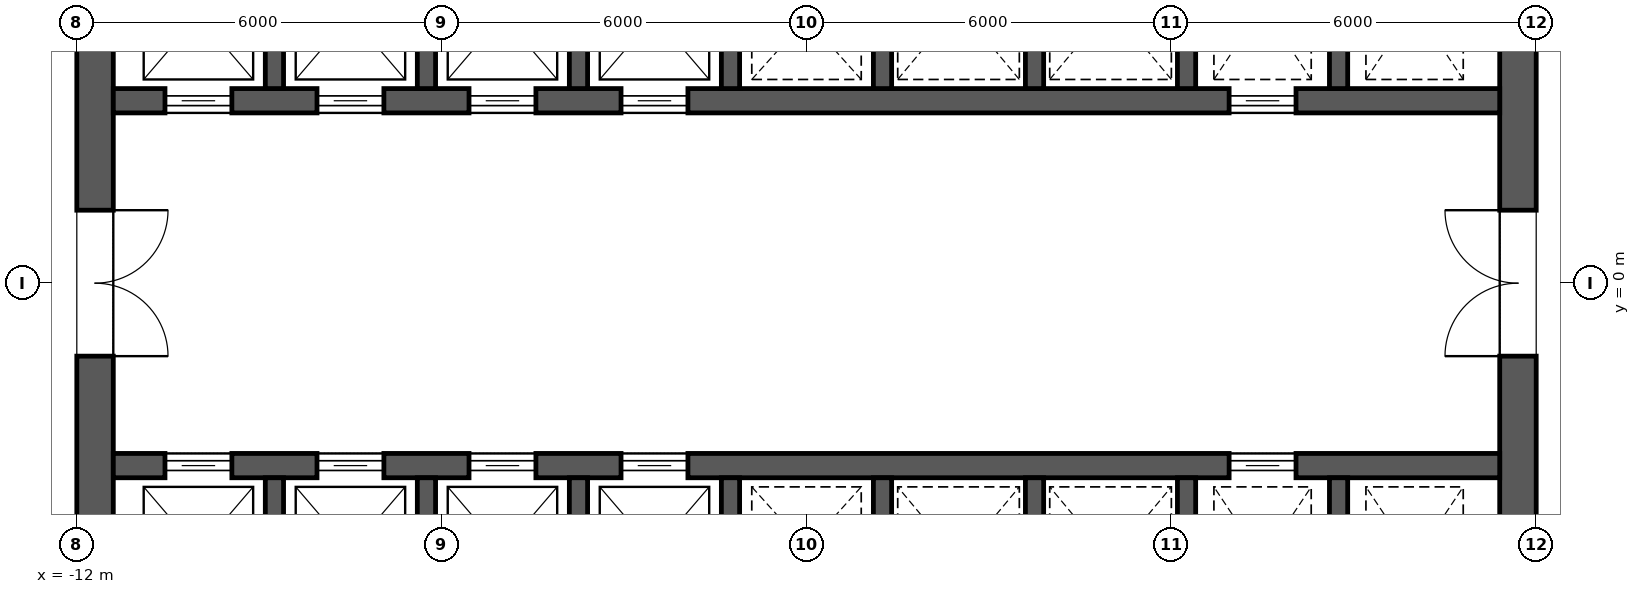
"""IFC4 building model, lengths in metres.
Left out: names, types, materials, properties, quantities, classifications, styles, units other than length and angle.
Written with IfcOpenShell. Run it as: python <this file> out.ifc"""

import sys

from ifc_helpers import new_model, si_unit, direction, frame, frame_2d, origin, place, context, subcontext, project, spatial, rectangle, extrude, element, fill, save


model = new_model("IFC4")
c1 = context("Model", 3, precision=1e-05, world=origin(), true_north=direction((0.0, 1.0)))
c2 = subcontext(c1, "Body", "Model", "MODEL_VIEW")
j1 = project(units=[si_unit("LENGTHUNIT", "METRE"), si_unit("PLANEANGLEUNIT", "RADIAN")], contexts=[c1])
p1 = place(None, origin())
s1 = spatial("IfcSite", under=j1, at=p1, CompositionType="ELEMENT")
p2 = place(p1, origin())
s2 = spatial("IfcBuilding", under=s1, at=p2, CompositionType="ELEMENT")
p3 = place(p2, frame((0.0, 0.0, 150.7)))
s3 = spatial("IfcBuildingStorey", under=s2, at=p3, CompositionType="ELEMENT", Elevation=150.7)
p4 = place(p3, frame((11.7, -11.4, 0.0), z_axis=(0.0, 0.0, 1.0), x_axis=(0.0, 1.0, 0.0)))
e1 = element("IfcWall", 1, at=p4, inside=s3, PredefinedType="SHEAR", context=c2, shape_type="SweptSolid", body=[
    extrude(rectangle(XDim=22.8, YDim=0.6, at=frame_2d((11.4, 0.0))), origin(), (0.0, 0.0, 1.0), 4.2),
])
p5 = place(p4, frame((10.2, 0.0, 0.0)))
e2 = element("IfcOpeningElement", 2, at=p5, cuts=e1, PredefinedType="OPENING", context=c2, shape_type="SweptSolid", body=[
    extrude(rectangle(XDim=2.4, YDim=2.1, at=frame_2d((1.2, 1.05))), frame((0.0, 0.312, 0.0), z_axis=(0.0, -1.0, 0.0), x_axis=(1.0, 0.0, 0.0)), (0.0, 0.0, 1.0), 0.624),
])
p6 = place(p4, frame((19.5, 0.0, 0.0)))
e3 = element("IfcOpeningElement", 3, at=p6, cuts=e1, PredefinedType="OPENING", context=c2, shape_type="SweptSolid", body=[
    extrude(rectangle(XDim=1.2, YDim=2.1, at=frame_2d((0.6, 1.05))), frame((0.0, 0.312, 0.0), z_axis=(0.0, -1.0, 0.0), x_axis=(1.0, 0.0, 0.0)), (0.0, 0.0, 1.0), 0.624),
])
p7 = place(p4, frame((2.1, 0.0, 0.0)))
e4 = element("IfcOpeningElement", 4, at=p7, cuts=e1, PredefinedType="OPENING", context=c2, shape_type="SweptSolid", body=[
    extrude(rectangle(XDim=1.2, YDim=2.1, at=frame_2d((0.6, 1.05))), frame((0.0, 0.312, 0.0), z_axis=(0.0, -1.0, 0.0), x_axis=(1.0, 0.0, 0.0)), (0.0, 0.0, 1.0), 0.624),
])
p8 = place(p3, frame((-11.7, -11.4, 0.0), z_axis=(0.0, 0.0, 1.0), x_axis=(0.0, 1.0, 0.0)))
e5 = element("IfcWall", 5, at=p8, inside=s3, PredefinedType="SHEAR", context=c2, shape_type="SweptSolid", body=[
    extrude(rectangle(XDim=22.8, YDim=0.6, at=frame_2d((11.4, 0.0))), origin(), (0.0, 0.0, 1.0), 4.2),
])
p9 = place(p8, frame((10.2, 0.0, 0.0)))
e6 = element("IfcOpeningElement", 6, at=p9, cuts=e5, PredefinedType="OPENING", context=c2, shape_type="SweptSolid", body=[
    extrude(rectangle(XDim=2.4, YDim=2.1, at=frame_2d((1.2, 1.05))), frame((0.0, 0.312, 0.0), z_axis=(0.0, -1.0, 0.0), x_axis=(1.0, 0.0, 0.0)), (0.0, 0.0, 1.0), 0.624),
])
p10 = place(p8, frame((18.925, 0.0, 0.0)))
e7 = element("IfcOpeningElement", 7, at=p10, cuts=e5, PredefinedType="OPENING", context=c2, shape_type="SweptSolid", body=[
    extrude(rectangle(XDim=1.2, YDim=2.1, at=frame_2d((0.6, 1.05))), frame((0.0, 0.312, 0.0), z_axis=(0.0, -1.0, 0.0), x_axis=(1.0, 0.0, 0.0)), (0.0, 0.0, 1.0), 0.624),
])
p11 = place(p8, frame((2.675, 0.0, 0.0)))
e8 = element("IfcOpeningElement", 8, at=p11, cuts=e5, PredefinedType="OPENING", context=c2, shape_type="SweptSolid", body=[
    extrude(rectangle(XDim=1.2, YDim=2.1, at=frame_2d((0.6, 1.05))), frame((0.0, 0.312, 0.0), z_axis=(0.0, -1.0, 0.0), x_axis=(1.0, 0.0, 0.0)), (0.0, 0.0, 1.0), 0.624),
])
p12 = place(p3, frame((-11.4, 3.0, 0.0), z_axis=(0.0, 0.0, 1.0), x_axis=(1.0, 0.0, 0.0)))
e9 = element("IfcWall", 9, at=p12, inside=s3, PredefinedType="SHEAR", context=c2, shape_type="SweptSolid", body=[
    extrude(rectangle(XDim=22.8, YDim=0.4, at=frame_2d((11.4, 0.0))), origin(), (0.0, 0.0, 1.0), 4.2),
])
p13 = place(p12, frame((0.85, 0.0, 0.0)))
e10 = element("IfcOpeningElement", 10, at=p13, cuts=e9, PredefinedType="OPENING", context=c2, shape_type="SweptSolid", body=[
    extrude(rectangle(XDim=1.1, YDim=2.1, at=frame_2d((0.55, 1.05))), frame((0.0, 0.212, 0.0), z_axis=(0.0, -1.0, 0.0), x_axis=(1.0, 0.0, 0.0)), (0.0, 0.0, 1.0), 0.424),
])
p14 = place(p12, frame((3.35, 0.0, 0.0)))
e11 = element("IfcOpeningElement", 11, at=p14, cuts=e9, PredefinedType="OPENING", context=c2, shape_type="SweptSolid", body=[
    extrude(rectangle(XDim=1.1, YDim=2.1, at=frame_2d((0.55, 1.05))), frame((0.0, 0.212, 0.0), z_axis=(0.0, -1.0, 0.0), x_axis=(1.0, 0.0, 0.0)), (0.0, 0.0, 1.0), 0.424),
])
p15 = place(p12, frame((5.85, 0.0, 0.0)))
e12 = element("IfcOpeningElement", 12, at=p15, cuts=e9, PredefinedType="OPENING", context=c2, shape_type="SweptSolid", body=[
    extrude(rectangle(XDim=1.1, YDim=2.1, at=frame_2d((0.55, 1.05))), frame((0.0, 0.212, 0.0), z_axis=(0.0, -1.0, 0.0), x_axis=(1.0, 0.0, 0.0)), (0.0, 0.0, 1.0), 0.424),
])
p16 = place(p12, frame((8.35, 0.0, 0.0)))
e13 = element("IfcOpeningElement", 13, at=p16, cuts=e9, PredefinedType="OPENING", context=c2, shape_type="SweptSolid", body=[
    extrude(rectangle(XDim=1.1, YDim=2.1, at=frame_2d((0.55, 1.05))), frame((0.0, 0.212, 0.0), z_axis=(0.0, -1.0, 0.0), x_axis=(1.0, 0.0, 0.0)), (0.0, 0.0, 1.0), 0.424),
])
p17 = place(p12, frame((18.35, 0.0, 0.0)))
e14 = element("IfcOpeningElement", 14, at=p17, cuts=e9, PredefinedType="OPENING", context=c2, shape_type="SweptSolid", body=[
    extrude(rectangle(XDim=1.1, YDim=2.1, at=frame_2d((0.55, 1.05))), frame((0.0, 0.212, 0.0), z_axis=(0.0, -1.0, 0.0), x_axis=(1.0, 0.0, 0.0)), (0.0, 0.0, 1.0), 0.424),
])
for number, where, z_axis, x_axis in (
    (15, (-8.75, 3.2, 0.0), (0.0, 0.0, 1.0), (0.0, 1.0, 0.0)),
    (16, (-6.25, 3.2, 0.0), (0.0, 0.0, 1.0), (0.0, 1.0, 0.0)),
    (17, (-3.75, 3.2, 0.0), (0.0, 0.0, 1.0), (0.0, 1.0, 0.0)),
    (18, (-1.25, 3.2, 0.0), (0.0, 0.0, 1.0), (0.0, 1.0, 0.0)),
    (19, (1.25, 3.2, 0.0), (0.0, 0.0, 1.0), (0.0, 1.0, 0.0)),
    (20, (3.75, 3.2, 0.0), (0.0, 0.0, 1.0), (0.0, 1.0, 0.0)),
    (21, (6.25, 3.2, 0.0), (0.0, 0.0, 1.0), (0.0, 1.0, 0.0)),
    (22, (8.75, 3.2, 0.0), (0.0, 0.0, 1.0), (0.0, 1.0, 0.0)),
):
    element("IfcWall", number, at=place(p3, frame(where, z_axis=z_axis, x_axis=x_axis)), inside=s3, PredefinedType="SHEAR", context=c2, shape_type="SweptSolid", body=[
        extrude(rectangle(XDim=2.9, YDim=0.3, at=frame_2d((1.45, 0.0))), origin(), (0.0, 0.0, 1.0), 4.2),
    ])
p18 = place(p3, frame((-11.4, -3.0, 0.0), z_axis=(0.0, 0.0, 1.0), x_axis=(1.0, 0.0, 0.0)))
e23 = element("IfcWall", 23, at=p18, inside=s3, PredefinedType="SHEAR", context=c2, shape_type="SweptSolid", body=[
    extrude(rectangle(XDim=22.8, YDim=0.4, at=frame_2d((11.4, 0.0))), origin(), (0.0, 0.0, 1.0), 4.2),
])
p19 = place(p18, frame((0.85, 0.0, 0.0)))
e24 = element("IfcOpeningElement", 24, at=p19, cuts=e23, PredefinedType="OPENING", context=c2, shape_type="SweptSolid", body=[
    extrude(rectangle(XDim=1.1, YDim=2.1, at=frame_2d((0.55, 1.05))), frame((0.0, 0.212, 0.0), z_axis=(0.0, -1.0, 0.0), x_axis=(1.0, 0.0, 0.0)), (0.0, 0.0, 1.0), 0.424),
])
p20 = place(p18, frame((3.35, 0.0, 0.0)))
e25 = element("IfcOpeningElement", 25, at=p20, cuts=e23, PredefinedType="OPENING", context=c2, shape_type="SweptSolid", body=[
    extrude(rectangle(XDim=1.1, YDim=2.1, at=frame_2d((0.55, 1.05))), frame((0.0, 0.212, 0.0), z_axis=(0.0, -1.0, 0.0), x_axis=(1.0, 0.0, 0.0)), (0.0, 0.0, 1.0), 0.424),
])
p21 = place(p18, frame((5.85, 0.0, 0.0)))
e26 = element("IfcOpeningElement", 26, at=p21, cuts=e23, PredefinedType="OPENING", context=c2, shape_type="SweptSolid", body=[
    extrude(rectangle(XDim=1.1, YDim=2.1, at=frame_2d((0.55, 1.05))), frame((0.0, 0.212, 0.0), z_axis=(0.0, -1.0, 0.0), x_axis=(1.0, 0.0, 0.0)), (0.0, 0.0, 1.0), 0.424),
])
p22 = place(p18, frame((8.35, 0.0, 0.0)))
e27 = element("IfcOpeningElement", 27, at=p22, cuts=e23, PredefinedType="OPENING", context=c2, shape_type="SweptSolid", body=[
    extrude(rectangle(XDim=1.1, YDim=2.1, at=frame_2d((0.55, 1.05))), frame((0.0, 0.212, 0.0), z_axis=(0.0, -1.0, 0.0), x_axis=(1.0, 0.0, 0.0)), (0.0, 0.0, 1.0), 0.424),
])
p23 = place(p18, frame((18.35, 0.0, 0.0)))
e28 = element("IfcOpeningElement", 28, at=p23, cuts=e23, PredefinedType="OPENING", context=c2, shape_type="SweptSolid", body=[
    extrude(rectangle(XDim=1.1, YDim=2.1, at=frame_2d((0.55, 1.05))), frame((0.0, 0.212, 0.0), z_axis=(0.0, -1.0, 0.0), x_axis=(1.0, 0.0, 0.0)), (0.0, 0.0, 1.0), 0.424),
])
for number, where, z_axis, x_axis in (
    (29, (-8.75, -6.1, 0.0), (0.0, 0.0, 1.0), (0.0, 1.0, 0.0)),
    (30, (-6.25, -6.1, 0.0), (0.0, 0.0, 1.0), (0.0, 1.0, 0.0)),
    (31, (-3.75, -6.1, 0.0), (0.0, 0.0, 1.0), (0.0, 1.0, 0.0)),
    (32, (-1.25, -6.1, 0.0), (0.0, 0.0, 1.0), (0.0, 1.0, 0.0)),
    (33, (1.25, -6.1, 0.0), (0.0, 0.0, 1.0), (0.0, 1.0, 0.0)),
    (34, (3.75, -6.1, 0.0), (0.0, 0.0, 1.0), (0.0, 1.0, 0.0)),
    (35, (6.25, -6.1, 0.0), (0.0, 0.0, 1.0), (0.0, 1.0, 0.0)),
    (36, (8.75, -6.1, 0.0), (0.0, 0.0, 1.0), (0.0, 1.0, 0.0)),
):
    element("IfcWall", number, at=place(p3, frame(where, z_axis=z_axis, x_axis=x_axis)), inside=s3, PredefinedType="SHEAR", context=c2, shape_type="SweptSolid", body=[
        extrude(rectangle(XDim=2.9, YDim=0.3, at=frame_2d((1.45, 0.0))), origin(), (0.0, 0.0, 1.0), 4.2),
    ])
p24 = place(p13, origin())
e37 = element("IfcDoor", 37, at=p24, inside=s3, OperationType="SLIDING_TO_LEFT", PredefinedType="DOOR", context=c2, shape_type="SweptSolid", body=[
    extrude(rectangle(XDim=1.1, YDim=2.1, at=frame_2d((0.55, 1.05))), frame((0.0, 0.025, 0.0), z_axis=(0.0, -1.0, 0.0), x_axis=(1.0, 0.0, 0.0)), (0.0, 0.0, 1.0), 0.05),
])
fill(e10, e37)
p25 = place(p14, origin())
e38 = element("IfcDoor", 38, at=p25, inside=s3, OperationType="SLIDING_TO_LEFT", PredefinedType="DOOR", context=c2, shape_type="SweptSolid", body=[
    extrude(rectangle(XDim=1.1, YDim=2.1, at=frame_2d((0.55, 1.05))), frame((0.0, 0.025, 0.0), z_axis=(0.0, -1.0, 0.0), x_axis=(1.0, 0.0, 0.0)), (0.0, 0.0, 1.0), 0.05),
])
fill(e11, e38)
p26 = place(p15, origin())
e39 = element("IfcDoor", 39, at=p26, inside=s3, OperationType="SLIDING_TO_LEFT", PredefinedType="DOOR", context=c2, shape_type="SweptSolid", body=[
    extrude(rectangle(XDim=1.1, YDim=2.1, at=frame_2d((0.55, 1.05))), frame((0.0, 0.025, 0.0), z_axis=(0.0, -1.0, 0.0), x_axis=(1.0, 0.0, 0.0)), (0.0, 0.0, 1.0), 0.05),
])
fill(e12, e39)
p27 = place(p16, origin())
e40 = element("IfcDoor", 40, at=p27, inside=s3, OperationType="SLIDING_TO_LEFT", PredefinedType="DOOR", context=c2, shape_type="SweptSolid", body=[
    extrude(rectangle(XDim=1.1, YDim=2.1, at=frame_2d((0.55, 1.05))), frame((0.0, 0.025, 0.0), z_axis=(0.0, -1.0, 0.0), x_axis=(1.0, 0.0, 0.0)), (0.0, 0.0, 1.0), 0.05),
])
fill(e13, e40)
p28 = place(p19, origin())
e41 = element("IfcDoor", 41, at=p28, inside=s3, OperationType="SLIDING_TO_LEFT", PredefinedType="DOOR", context=c2, shape_type="SweptSolid", body=[
    extrude(rectangle(XDim=1.1, YDim=2.1, at=frame_2d((0.55, 1.05))), frame((0.0, 0.025, 0.0), z_axis=(0.0, -1.0, 0.0), x_axis=(1.0, 0.0, 0.0)), (0.0, 0.0, 1.0), 0.05),
])
fill(e24, e41)
p29 = place(p20, origin())
e42 = element("IfcDoor", 42, at=p29, inside=s3, OperationType="SLIDING_TO_LEFT", PredefinedType="DOOR", context=c2, shape_type="SweptSolid", body=[
    extrude(rectangle(XDim=1.1, YDim=2.1, at=frame_2d((0.55, 1.05))), frame((0.0, 0.025, 0.0), z_axis=(0.0, -1.0, 0.0), x_axis=(1.0, 0.0, 0.0)), (0.0, 0.0, 1.0), 0.05),
])
fill(e25, e42)
p30 = place(p21, origin())
e43 = element("IfcDoor", 43, at=p30, inside=s3, OperationType="SLIDING_TO_LEFT", PredefinedType="DOOR", context=c2, shape_type="SweptSolid", body=[
    extrude(rectangle(XDim=1.1, YDim=2.1, at=frame_2d((0.55, 1.05))), frame((0.0, 0.025, 0.0), z_axis=(0.0, -1.0, 0.0), x_axis=(1.0, 0.0, 0.0)), (0.0, 0.0, 1.0), 0.05),
])
fill(e26, e43)
p31 = place(p22, origin())
e44 = element("IfcDoor", 44, at=p31, inside=s3, OperationType="SLIDING_TO_LEFT", PredefinedType="DOOR", context=c2, shape_type="SweptSolid", body=[
    extrude(rectangle(XDim=1.1, YDim=2.1, at=frame_2d((0.55, 1.05))), frame((0.0, 0.025, 0.0), z_axis=(0.0, -1.0, 0.0), x_axis=(1.0, 0.0, 0.0)), (0.0, 0.0, 1.0), 0.05),
])
fill(e27, e44)
p32 = place(p17, origin())
e45 = element("IfcDoor", 45, at=p32, inside=s3, OperationType="SLIDING_TO_LEFT", PredefinedType="DOOR", context=c2, shape_type="SweptSolid", body=[
    extrude(rectangle(XDim=1.1, YDim=2.1, at=frame_2d((0.55, 1.05))), frame((0.0, 0.025, 0.0), z_axis=(0.0, -1.0, 0.0), x_axis=(1.0, 0.0, 0.0)), (0.0, 0.0, 1.0), 0.05),
])
fill(e14, e45)
p33 = place(p23, origin())
e46 = element("IfcDoor", 46, at=p33, inside=s3, OperationType="SLIDING_TO_LEFT", PredefinedType="DOOR", context=c2, shape_type="SweptSolid", body=[
    extrude(rectangle(XDim=1.1, YDim=2.1, at=frame_2d((0.55, 1.05))), frame((0.0, 0.025, 0.0), z_axis=(0.0, -1.0, 0.0), x_axis=(1.0, 0.0, 0.0)), (0.0, 0.0, 1.0), 0.05),
])
fill(e28, e46)
p34 = place(p9, frame((2.4, 0.0, 0.0), z_axis=(0.0, 0.0, 1.0), x_axis=(-1.0, 0.0, 0.0)))
e47 = element("IfcDoor", 47, at=p34, inside=s3, OperationType="DOUBLE_DOOR_SINGLE_SWING", PredefinedType="DOOR", context=c2, shape_type="SweptSolid", body=[
    extrude(rectangle(XDim=2.4, YDim=2.1, at=frame_2d((1.2, 1.05))), frame((0.0, 0.025, 0.0), z_axis=(0.0, -1.0, 0.0), x_axis=(1.0, 0.0, 0.0)), (0.0, 0.0, 1.0), 0.05),
])
fill(e6, e47)
p35 = place(p5, origin())
e48 = element("IfcDoor", 48, at=p35, inside=s3, OperationType="DOUBLE_DOOR_SINGLE_SWING", PredefinedType="DOOR", context=c2, shape_type="SweptSolid", body=[
    extrude(rectangle(XDim=2.4, YDim=2.1, at=frame_2d((1.2, 1.05))), frame((0.0, 0.025, 0.0), z_axis=(0.0, -1.0, 0.0), x_axis=(1.0, 0.0, 0.0)), (0.0, 0.0, 1.0), 0.05),
])
fill(e2, e48)
save(model, sys.argv[1])
